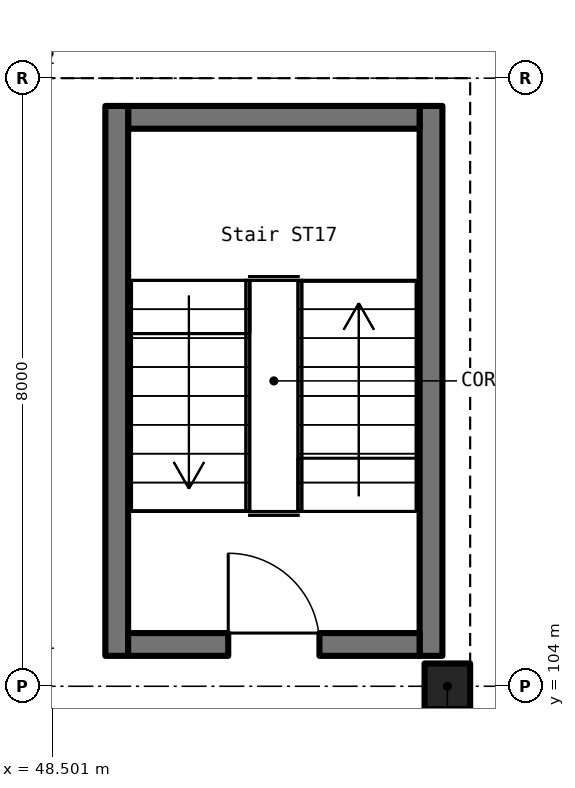
"""IFC4 building model, lengths in metres.
Left out: names, types, materials, properties, quantities, classifications, styles, units other than length and angle.
Written with IfcOpenShell. Run it as: python <this file> out.ifc"""

import sys

from ifc_helpers import new_model, si_unit, direction, frame, frame_2d, origin, origin_2d, place, context, subcontext, project, spatial, rectangle, extrude, element, fill, save


model = new_model("IFC4")
c1 = context("Model", 3, precision=1e-05, world=origin(), true_north=direction((0.0, 1.0)))
c2 = subcontext(c1, "Body", "Model", "MODEL_VIEW")
j1 = project(units=[si_unit("LENGTHUNIT", "METRE"), si_unit("PLANEANGLEUNIT", "RADIAN")], contexts=[c1])
p1 = place(None, origin())
s1 = spatial("IfcSite", under=j1, at=p1, CompositionType="ELEMENT")
p2 = place(p1, origin())
s2 = spatial("IfcBuilding", under=s1, at=p2, CompositionType="ELEMENT")
p3 = place(p2, frame((0.0, 0.0, -6.0)))
s3 = spatial("IfcBuildingStorey", under=s2, at=p3, CompositionType="ELEMENT", Elevation=-6.0)
p4 = place(p3, frame((53.7, 104.0, 0.0), z_axis=(0.0, 0.0, 1.0), x_axis=(1.0, 0.0, 0.0)))
e1 = element("IfcColumn", 1, at=p4, inside=s3, PredefinedType="COLUMN", context=c2, shape_type="SweptSolid", body=[
    extrude(rectangle(XDim=0.6, YDim=0.6, at=origin_2d()), origin(), (0.0, 0.0, 1.0), 6.0),
])
p5 = place(p3, frame((53.485, 104.4, 0.0), z_axis=(0.0, 0.0, 1.0), x_axis=(0.0, 1.0, 0.0)))
e2 = element("IfcWall", 2, at=p5, inside=s3, PredefinedType="SOLIDWALL", context=c2, shape_type="SweptSolid", body=[
    extrude(rectangle(XDim=7.235, YDim=0.3, at=frame_2d((3.618, 0.0))), origin(), (0.0, 0.0, 1.0), 6.0),
])
p6 = place(p3, frame((53.335, 111.485, 0.0), z_axis=(0.0, 0.0, 1.0), x_axis=(-1.0, 0.0, 0.0)))
e3 = element("IfcWall", 3, at=p6, inside=s3, PredefinedType="SOLIDWALL", context=c2, shape_type="SweptSolid", body=[
    extrude(rectangle(XDim=3.835, YDim=0.3, at=frame_2d((1.917, 0.0))), origin(), (0.0, 0.0, 1.0), 6.0),
])
p7 = place(p3, frame((49.35, 111.635, 0.0), z_axis=(0.0, 0.0, 1.0), x_axis=(0.0, -1.0, 0.0)))
e4 = element("IfcWall", 4, at=p7, inside=s3, PredefinedType="SOLIDWALL", context=c2, shape_type="SweptSolid", body=[
    extrude(rectangle(XDim=7.235, YDim=0.3, at=frame_2d((3.618, 0.0))), origin(), (0.0, 0.0, 1.0), 6.0),
])
p8 = place(p3, frame((49.5, 104.55, 0.0), z_axis=(0.0, 0.0, 1.0), x_axis=(1.0, 0.0, 0.0)))
e5 = element("IfcWall", 5, at=p8, inside=s3, PredefinedType="SOLIDWALL", context=c2, shape_type="SweptSolid", body=[
    extrude(rectangle(XDim=3.835, YDim=0.3, at=frame_2d((1.917, 0.0))), origin(), (0.0, 0.0, 1.0), 6.0),
])
p9 = place(p8, frame((1.317, 0.0, 0.0)))
e6 = element("IfcOpeningElement", 6, at=p9, cuts=e5, PredefinedType="OPENING", context=c2, shape_type="SweptSolid", body=[
    extrude(rectangle(XDim=1.2, YDim=2.1, at=frame_2d((0.6, 1.05))), frame((0.0, 0.162, 0.0), z_axis=(0.0, -1.0, 0.0), x_axis=(1.0, 0.0, 0.0)), (0.0, 0.0, 1.0), 0.324),
])
p10 = place(p9, origin())
e7 = element("IfcDoor", 7, at=p10, inside=s3, OperationType="SINGLE_SWING_LEFT", PredefinedType="DOOR", context=c2, shape_type="SweptSolid", body=[
    extrude(rectangle(XDim=1.2, YDim=2.1, at=frame_2d((0.6, 1.05))), frame((0.0, 0.025, 0.0), z_axis=(0.0, -1.0, 0.0), x_axis=(1.0, 0.0, 0.0)), (0.0, 0.0, 1.0), 0.05),
])
fill(e6, e7)
save(model, sys.argv[1])
